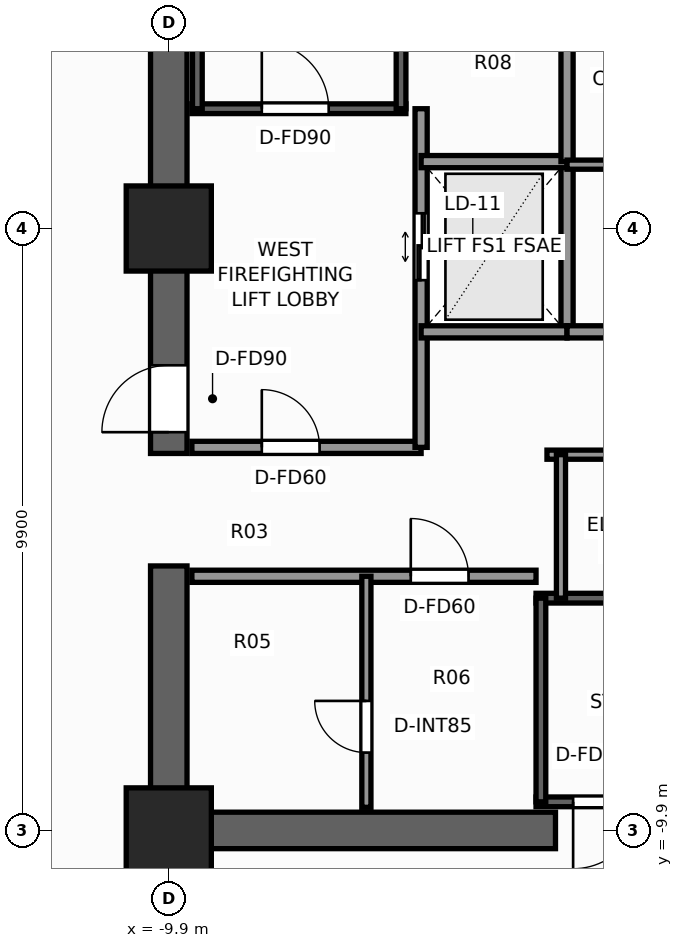
"""IFC4 building model, lengths in metres.
Left out: names, types, materials, properties, quantities, classifications, styles, units other than length and angle.
Written with IfcOpenShell. Run it as: python <this file> out.ifc"""

import sys

from ifc_helpers import new_model, si_unit, direction, frame, frame_2d, origin, origin_2d, place, context, subcontext, project, spatial, rectangle, extrude, element, fill, save


model = new_model("IFC4")
c1 = context("Model", 3, precision=1e-05, world=origin(), true_north=direction((0.0, 1.0)))
c2 = subcontext(c1, "Body", "Model", "MODEL_VIEW")
j1 = project(units=[si_unit("LENGTHUNIT", "METRE"), si_unit("PLANEANGLEUNIT", "RADIAN")], contexts=[c1])
p1 = place(None, origin())
s1 = spatial("IfcSite", under=j1, at=p1, CompositionType="ELEMENT")
p2 = place(p1, origin())
s2 = spatial("IfcBuilding", under=s1, at=p2, CompositionType="ELEMENT")
p3 = place(p2, frame((0.0, 0.0, 46.9)))
s3 = spatial("IfcBuildingStorey", under=s2, at=p3, CompositionType="ELEMENT", Elevation=46.9)
p4 = place(p3, frame((-3.54, -9.9, 0.0), z_axis=(0.0, 0.0, 1.0), x_axis=(-1.0, 0.0, 0.0)))
e1 = element("IfcWall", 1, at=p4, inside=s3, PredefinedType="SHEAR", context=c2, shape_type="SweptSolid", body=[
    extrude(rectangle(XDim=6.66, YDim=0.6, at=frame_2d((3.33, 0.0))), origin(), (0.0, 0.0, 1.0), 3.3),
])
p5 = place(p3, frame((-9.9, -9.6, 0.0), z_axis=(0.0, 0.0, 1.0), x_axis=(0.0, 1.0, 0.0)))
e2 = element("IfcWall", 2, at=p5, inside=s3, PredefinedType="SHEAR", context=c2, shape_type="SweptSolid", body=[
    extrude(rectangle(XDim=4.05, YDim=0.6, at=frame_2d((2.025, 0.0))), origin(), (0.0, 0.0, 1.0), 3.3),
])
p6 = place(p3, frame((-9.9, -3.7, 0.0), z_axis=(0.0, 0.0, 1.0), x_axis=(0.0, 1.0, 0.0)))
e3 = element("IfcWall", 3, at=p6, inside=s3, PredefinedType="SHEAR", context=c2, shape_type="SweptSolid", body=[
    extrude(rectangle(XDim=13.3, YDim=0.6, at=frame_2d((6.65, 0.0))), origin(), (0.0, 0.0, 1.0), 3.3),
])
p7 = place(p6, frame((0.35, 0.0, 0.0)))
e4 = element("IfcOpeningElement", 4, at=p7, cuts=e3, PredefinedType="OPENING", context=c2, shape_type="SweptSolid", body=[
    extrude(rectangle(XDim=1.1, YDim=2.2, at=frame_2d((0.55, 1.1))), frame((0.0, 0.31, 0.0), z_axis=(0.0, -1.0, 0.0), x_axis=(1.0, 0.0, 0.0)), (0.0, 0.0, 1.0), 0.62),
])
for number, where, z_axis, x_axis in (
    (5, (-9.9, -9.9, 0.0), (0.0, 0.0, 1.0), (1.0, 0.0, 0.0)),
    (6, (-9.9, 0.0, 0.0), (0.0, 0.0, 1.0), (1.0, 0.0, 0.0)),
):
    element("IfcColumn", number, at=place(p3, frame(where, z_axis=z_axis, x_axis=x_axis)), inside=s3, PredefinedType="COLUMN", context=c2, shape_type="SweptSolid", body=[
        extrude(rectangle(XDim=1.4, YDim=1.4, at=origin_2d()), origin(), (0.0, 0.0, 1.0), 3.3),
    ])
p8 = place(p3, frame((-9.52, 1.97, 0.0), z_axis=(0.0, 0.0, 1.0), x_axis=(1.0, 0.0, 0.0)))
e7 = element("IfcWall", 7, at=p8, inside=s3, PredefinedType="SHEAR", context=c2, shape_type="SweptSolid", body=[
    extrude(rectangle(XDim=3.52, YDim=0.16, at=frame_2d((1.76, 0.0))), origin(), (0.0, 0.0, 1.0), 3.3),
])
p9 = place(p8, frame((1.15, 0.0, 0.0)))
e8 = element("IfcOpeningElement", 8, at=p9, cuts=e7, PredefinedType="OPENING", context=c2, shape_type="SweptSolid", body=[
    extrude(rectangle(XDim=1.1, YDim=2.2, at=frame_2d((0.55, 1.1))), frame((0.0, 0.09, 0.0), z_axis=(0.0, -1.0, 0.0), x_axis=(1.0, 0.0, 0.0)), (0.0, 0.0, 1.0), 0.18),
])
for number, where, z_axis, x_axis in (
    (9, (-9.43, 1.97, 0.0), (0.0, 0.0, 1.0), (0.0, 1.0, 0.0)),
    (10, (-6.08, 1.97, 0.0), (0.0, 0.0, 1.0), (0.0, 1.0, 0.0)),
):
    element("IfcWall", number, at=place(p3, frame(where, z_axis=z_axis, x_axis=x_axis)), inside=s3, PredefinedType="SHEAR", context=c2, shape_type="SweptSolid", body=[
        extrude(rectangle(XDim=7.56, YDim=0.16, at=frame_2d((3.78, 0.0))), origin(), (0.0, 0.0, 1.0), 3.3),
    ])
p10 = place(p3, frame((3.86, -9.43, 0.0), z_axis=(0.0, 0.0, 1.0), x_axis=(-1.0, 0.0, 0.0)))
e11 = element("IfcWall", 11, at=p10, inside=s3, PredefinedType="SHEAR", context=c2, shape_type="SweptSolid", body=[
    extrude(rectangle(XDim=7.72, YDim=0.16, at=frame_2d((3.86, 0.0))), origin(), (0.0, 0.0, 1.0), 3.3),
])
p11 = place(p10, frame((6.01, 0.0, 0.0)))
e12 = element("IfcOpeningElement", 12, at=p11, cuts=e11, PredefinedType="OPENING", context=c2, shape_type="SweptSolid", body=[
    extrude(rectangle(XDim=1.1, YDim=2.2, at=frame_2d((0.55, 1.1))), frame((0.0, 0.09, 0.0), z_axis=(0.0, -1.0, 0.0), x_axis=(1.0, 0.0, 0.0)), (0.0, 0.0, 1.0), 0.18),
])
p12 = place(p3, frame((-3.86, -6.08, 0.0), z_axis=(0.0, 0.0, 1.0), x_axis=(1.0, 0.0, 0.0)))
e13 = element("IfcWall", 13, at=p12, inside=s3, PredefinedType="SHEAR", context=c2, shape_type="SweptSolid", body=[
    extrude(rectangle(XDim=7.72, YDim=0.16, at=frame_2d((3.86, 0.0))), origin(), (0.0, 0.0, 1.0), 3.3),
])
p13 = place(p3, frame((-3.78, -9.43, 0.0), z_axis=(0.0, 0.0, 1.0), x_axis=(0.0, 1.0, 0.0)))
e14 = element("IfcWall", 14, at=p13, inside=s3, PredefinedType="SHEAR", context=c2, shape_type="SweptSolid", body=[
    extrude(rectangle(XDim=3.35, YDim=0.16, at=frame_2d((1.675, 0.0))), origin(), (0.0, 0.0, 1.0), 3.3),
])
p14 = place(p3, frame((-9.52, -3.6, 0.0), z_axis=(0.0, 0.0, 1.0), x_axis=(1.0, 0.0, 0.0)))
e15 = element("IfcWall", 15, at=p14, inside=s3, PredefinedType="SOLIDWALL", context=c2, shape_type="SweptSolid", body=[
    extrude(rectangle(XDim=3.77, YDim=0.2, at=frame_2d((1.885, 0.0))), origin(), (0.0, 0.0, 1.0), 3.06),
])
p15 = place(p14, frame((1.15, 0.0, 0.0)))
e16 = element("IfcOpeningElement", 16, at=p15, cuts=e15, PredefinedType="OPENING", context=c2, shape_type="SweptSolid", body=[
    extrude(rectangle(XDim=0.95, YDim=2.06, at=frame_2d((0.475, 1.03))), frame((0.0, 0.11, 0.0), z_axis=(0.0, -1.0, 0.0), x_axis=(1.0, 0.0, 0.0)), (0.0, 0.0, 1.0), 0.22),
])
p16 = place(p3, frame((-5.75, -3.6, 0.0), z_axis=(0.0, 0.0, 1.0), x_axis=(0.0, 1.0, 0.0)))
e17 = element("IfcWall", 17, at=p16, inside=s3, PredefinedType="SOLIDWALL", context=c2, shape_type="SweptSolid", body=[
    extrude(rectangle(XDim=5.57, YDim=0.2, at=frame_2d((2.785, 0.0))), origin(), (0.0, 0.0, 1.0), 3.06),
])
p17 = place(p16, frame((2.75, 0.0, 0.0)))
e18 = element("IfcOpeningElement", 18, at=p17, cuts=e17, PredefinedType="OPENING", context=c2, shape_type="SweptSolid", body=[
    extrude(rectangle(XDim=1.1, YDim=2.2, at=frame_2d((0.55, 1.1))), frame((0.0, 0.11, 0.0), z_axis=(0.0, -1.0, 0.0), x_axis=(1.0, 0.0, 0.0)), (0.0, 0.0, 1.0), 0.22),
])
p18 = place(p3, frame((-3.35, -1.7, 0.0), z_axis=(0.0, 0.0, 1.0), x_axis=(0.0, 1.0, 0.0)))
e19 = element("IfcWall", 19, at=p18, inside=s3, PredefinedType="SOLIDWALL", context=c2, shape_type="SweptSolid", body=[
    extrude(rectangle(XDim=2.8, YDim=0.2, at=frame_2d((1.4, 0.0))), origin(), (0.0, 0.0, 1.0), 3.06),
])
for number, where, z_axis, x_axis in (
    (20, (-5.75, -1.7, 0.0), (0.0, 0.0, 1.0), (1.0, 0.0, 0.0)),
    (21, (-5.75, 1.1, 0.0), (0.0, 0.0, 1.0), (1.0, 0.0, 0.0)),
):
    element("IfcWall", number, at=place(p3, frame(where, z_axis=z_axis, x_axis=x_axis)), inside=s3, PredefinedType="SOLIDWALL", context=c2, shape_type="SweptSolid", body=[
        extrude(rectangle(XDim=2.4, YDim=0.2, at=frame_2d((1.2, 0.0))), origin(), (0.0, 0.0, 1.0), 3.06),
    ])
p19 = place(p3, frame((-9.52, -5.72, 0.0), z_axis=(0.0, 0.0, 1.0), x_axis=(1.0, 0.0, 0.0)))
e22 = element("IfcWall", 22, at=p19, inside=s3, PredefinedType="SOLIDWALL", context=c2, shape_type="SweptSolid", body=[
    extrude(rectangle(XDim=5.66, YDim=0.2, at=frame_2d((2.83, 0.0))), origin(), (0.0, 0.0, 1.0), 3.06),
])
p20 = place(p19, frame((3.6, 0.0, 0.0)))
e23 = element("IfcOpeningElement", 23, at=p20, cuts=e22, PredefinedType="OPENING", context=c2, shape_type="SweptSolid", body=[
    extrude(rectangle(XDim=0.95, YDim=2.06, at=frame_2d((0.475, 1.03))), frame((0.0, 0.11, 0.0), z_axis=(0.0, -1.0, 0.0), x_axis=(1.0, 0.0, 0.0)), (0.0, 0.0, 1.0), 0.22),
])
p21 = place(p3, frame((-6.65, -9.52, 0.0), z_axis=(0.0, 0.0, 1.0), x_axis=(0.0, 1.0, 0.0)))
e24 = element("IfcWall", 24, at=p21, inside=s3, PredefinedType="PARTITIONING", context=c2, shape_type="SweptSolid", body=[
    extrude(rectangle(XDim=3.8, YDim=0.15, at=frame_2d((1.9, 0.0))), origin(), (0.0, 0.0, 1.0), 3.06),
])
p22 = place(p21, frame((0.9, 0.0, 0.0)))
e25 = element("IfcOpeningElement", 25, at=p22, cuts=e24, PredefinedType="OPENING", context=c2, shape_type="SweptSolid", body=[
    extrude(rectangle(XDim=0.85, YDim=2.03, at=frame_2d((0.425, 1.015))), frame((0.0, 0.085, 0.0), z_axis=(0.0, -1.0, 0.0), x_axis=(1.0, 0.0, 0.0)), (0.0, 0.0, 1.0), 0.17),
])
p23 = place(p3, frame((-3.35, -1.7, 0.0), z_axis=(0.0, 0.0, 1.0), x_axis=(1.0, 0.0, 0.0)))
e26 = element("IfcWall", 26, at=p23, inside=s3, PredefinedType="SOLIDWALL", context=c2, shape_type="SweptSolid", body=[
    extrude(rectangle(XDim=6.7, YDim=0.2, at=frame_2d((3.35, 0.0))), origin(), (0.0, 0.0, 1.0), 3.06),
])
p24 = place(p3, frame((-3.35, 1.1, 0.0), z_axis=(0.0, 0.0, 1.0), x_axis=(0.0, 1.0, 0.0)))
e27 = element("IfcWall", 27, at=p24, inside=s3, PredefinedType="SOLIDWALL", context=c2, shape_type="SweptSolid", body=[
    extrude(rectangle(XDim=3.2, YDim=0.2, at=frame_2d((1.6, 0.0))), origin(), (0.0, 0.0, 1.0), 3.06),
])
p25 = place(p3, frame((-3.35, 1.05, 0.0), z_axis=(0.0, 0.0, 1.0), x_axis=(1.0, 0.0, 0.0)))
e28 = element("IfcWall", 28, at=p25, inside=s3, PredefinedType="PARTITIONING", context=c2, shape_type="SweptSolid", body=[
    extrude(rectangle(XDim=6.7, YDim=0.15, at=frame_2d((3.35, 0.0))), origin(), (0.0, 0.0, 1.0), 3.06),
])
p26 = place(p25, frame((4.2, 0.0, 0.0)))
e29 = element("IfcOpeningElement", 29, at=p26, cuts=e28, PredefinedType="OPENING", context=c2, shape_type="SweptSolid", body=[
    extrude(rectangle(XDim=0.85, YDim=2.03, at=frame_2d((0.425, 1.015))), frame((0.0, 0.085, 0.0), z_axis=(0.0, -1.0, 0.0), x_axis=(1.0, 0.0, 0.0)), (0.0, 0.0, 1.0), 0.17),
])
p27 = place(p3, frame((-3.68, -3.72, 0.0), z_axis=(0.0, 0.0, 1.0), x_axis=(1.0, 0.0, 0.0)))
e30 = element("IfcWall", 30, at=p27, inside=s3, PredefinedType="PARTITIONING", context=c2, shape_type="SweptSolid", body=[
    extrude(rectangle(XDim=7.36, YDim=0.15, at=frame_2d((3.68, 0.0))), origin(), (0.0, 0.0, 1.0), 3.06),
])
p28 = place(p3, frame((-3.45, -6.08, 0.0), z_axis=(0.0, 0.0, 1.0), x_axis=(0.0, 1.0, 0.0)))
e31 = element("IfcWall", 31, at=p28, inside=s3, PredefinedType="PARTITIONING", context=c2, shape_type="SweptSolid", body=[
    extrude(rectangle(XDim=2.36, YDim=0.15, at=frame_2d((1.18, 0.0))), origin(), (0.0, 0.0, 1.0), 3.06),
])
p29 = place(p9, origin())
e32 = element("IfcDoor", 32, at=p29, inside=s3, OperationType="SINGLE_SWING_LEFT", PredefinedType="DOOR", context=c2, shape_type="SweptSolid", body=[
    extrude(rectangle(XDim=1.1, YDim=2.2, at=frame_2d((0.55, 1.1))), frame((0.0, 0.025, 0.0), z_axis=(0.0, -1.0, 0.0), x_axis=(1.0, 0.0, 0.0)), (0.0, 0.0, 1.0), 0.05),
])
fill(e8, e32)
p30 = place(p11, origin())
e33 = element("IfcDoor", 33, at=p30, inside=s3, OperationType="SINGLE_SWING_RIGHT", PredefinedType="DOOR", context=c2, shape_type="SweptSolid", body=[
    extrude(rectangle(XDim=1.1, YDim=2.2, at=frame_2d((0.55, 1.1))), frame((0.0, 0.025, 0.0), z_axis=(0.0, -1.0, 0.0), x_axis=(1.0, 0.0, 0.0)), (0.0, 0.0, 1.0), 0.05),
])
fill(e12, e33)
p31 = place(p7, origin())
e34 = element("IfcDoor", 34, at=p31, inside=s3, OperationType="SINGLE_SWING_LEFT", PredefinedType="DOOR", context=c2, shape_type="SweptSolid", body=[
    extrude(rectangle(XDim=1.1, YDim=2.2, at=frame_2d((0.55, 1.1))), frame((0.0, 0.025, 0.0), z_axis=(0.0, -1.0, 0.0), x_axis=(1.0, 0.0, 0.0)), (0.0, 0.0, 1.0), 0.05),
])
fill(e4, e34)
p32 = place(p17, origin())
e35 = element("IfcDoor", 35, at=p32, inside=s3, OperationType="DOUBLE_DOOR_SLIDING", PredefinedType="DOOR", context=c2, shape_type="SweptSolid", body=[
    extrude(rectangle(XDim=1.1, YDim=2.2, at=frame_2d((0.55, 1.1))), frame((0.0, 0.025, 0.0), z_axis=(0.0, -1.0, 0.0), x_axis=(1.0, 0.0, 0.0)), (0.0, 0.0, 1.0), 0.05),
])
fill(e18, e35)
p33 = place(p20, origin())
e36 = element("IfcDoor", 36, at=p33, inside=s3, OperationType="SINGLE_SWING_LEFT", PredefinedType="DOOR", context=c2, shape_type="SweptSolid", body=[
    extrude(rectangle(XDim=0.95, YDim=2.06, at=frame_2d((0.475, 1.03))), frame((0.0, 0.025, 0.0), z_axis=(0.0, -1.0, 0.0), x_axis=(1.0, 0.0, 0.0)), (0.0, 0.0, 1.0), 0.05),
])
fill(e23, e36)
p34 = place(p22, origin())
e37 = element("IfcDoor", 37, at=p34, inside=s3, OperationType="SINGLE_SWING_RIGHT", PredefinedType="DOOR", context=c2, shape_type="SweptSolid", body=[
    extrude(rectangle(XDim=0.85, YDim=2.03, at=frame_2d((0.425, 1.015))), frame((0.0, 0.025, 0.0), z_axis=(0.0, -1.0, 0.0), x_axis=(1.0, 0.0, 0.0)), (0.0, 0.0, 1.0), 0.05),
])
fill(e25, e37)
p35 = place(p15, origin())
e38 = element("IfcDoor", 38, at=p35, inside=s3, OperationType="SINGLE_SWING_LEFT", PredefinedType="DOOR", context=c2, shape_type="SweptSolid", body=[
    extrude(rectangle(XDim=0.95, YDim=2.06, at=frame_2d((0.475, 1.03))), frame((0.0, 0.025, 0.0), z_axis=(0.0, -1.0, 0.0), x_axis=(1.0, 0.0, 0.0)), (0.0, 0.0, 1.0), 0.05),
])
fill(e16, e38)
save(model, sys.argv[1])
